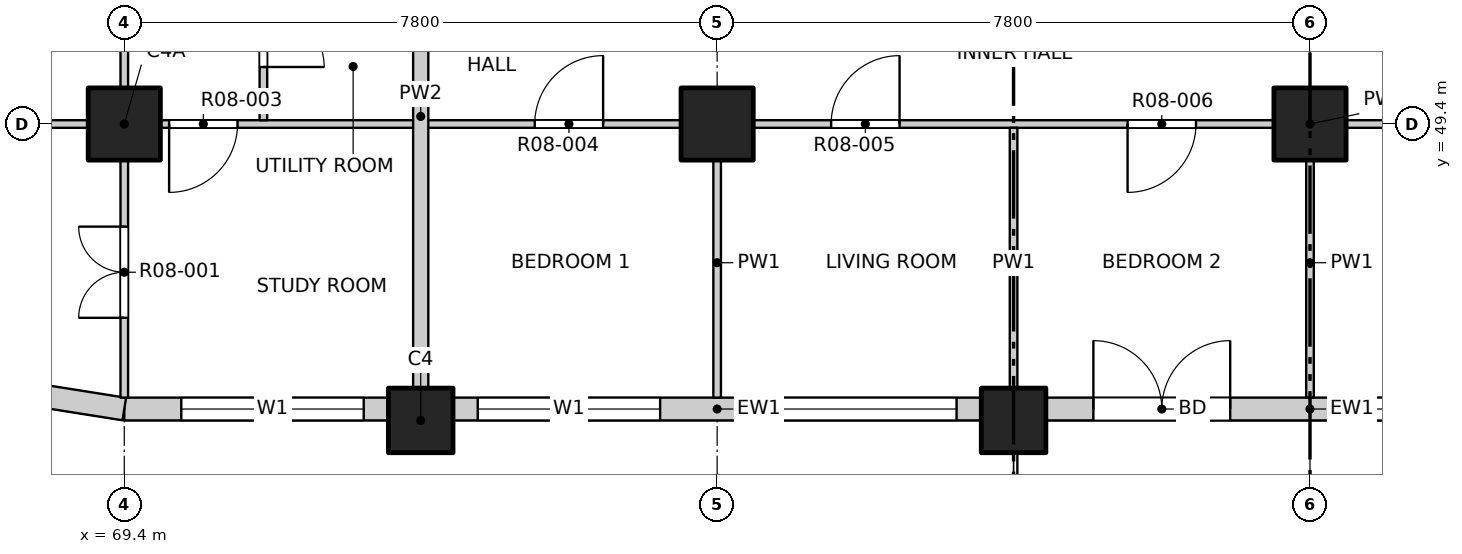
"""IFC4 building model, lengths in metres.
Left out: names, types, materials, properties, quantities, classifications, styles, units other than length and angle.
Written with IfcOpenShell. Run it as: python <this file> out.ifc"""

import sys

from ifc_helpers import new_model, si_unit, direction, frame, frame_2d, origin, origin_2d, place, context, subcontext, project, spatial, rectangle, extrude, element, fill, save


model = new_model("IFC4")
c1 = context("Model", 3, precision=1e-05, world=origin(), true_north=direction((0.0, 1.0)))
c2 = subcontext(c1, "Body", "Model", "MODEL_VIEW")
j1 = project(units=[si_unit("LENGTHUNIT", "METRE"), si_unit("PLANEANGLEUNIT", "RADIAN")], contexts=[c1])
p1 = place(None, origin())
s1 = spatial("IfcSite", under=j1, at=p1, CompositionType="ELEMENT")
p2 = place(p1, origin())
s2 = spatial("IfcBuilding", under=s1, at=p2, CompositionType="ELEMENT")
p3 = place(p2, frame((0.0, 0.0, 103.3)))
s3 = spatial("IfcBuildingStorey", under=s2, at=p3, CompositionType="ELEMENT", Elevation=103.3)
for number, where, z_axis, x_axis in (
    (1, (73.3, 45.5, -0.25), (0.0, 0.0, 1.0), (1.0, 0.0, 0.0)),
    (2, (81.1, 45.5, -0.25), (0.0, 0.0, 1.0), (1.0, 0.0, 0.0)),
):
    element("IfcColumn", number, at=place(p3, frame(where, z_axis=z_axis, x_axis=x_axis)), inside=s3, PredefinedType="COLUMN", context=c2, shape_type="SweptSolid", body=[
        extrude(rectangle(XDim=0.85, YDim=0.85, at=origin_2d()), origin(), (0.0, 0.0, 1.0), 3.4),
    ])
for number, where, z_axis, x_axis in (
    (3, (69.4, 49.4, -0.25), (0.0, 0.0, 1.0), (1.0, 0.0, 0.0)),
    (4, (77.2, 49.4, -0.25), (0.0, 0.0, 1.0), (1.0, 0.0, 0.0)),
    (5, (85.0, 49.4, -0.25), (0.0, 0.0, 1.0), (1.0, 0.0, 0.0)),
):
    element("IfcColumn", number, at=place(p3, frame(where, z_axis=z_axis, x_axis=x_axis)), inside=s3, PredefinedType="COLUMN", context=c2, shape_type="SweptSolid", body=[
        extrude(rectangle(XDim=0.95, YDim=0.95, at=origin_2d()), origin(), (0.0, 0.0, 1.0), 3.4),
    ])
p4 = place(p3, frame((69.4, 45.65, 0.0), z_axis=(0.0, 0.0, 1.0), x_axis=(1.0, 0.0, 0.0)))
e6 = element("IfcWall", 6, at=p4, inside=s3, PredefinedType="SOLIDWALL", context=c2, shape_type="SweptSolid", body=[
    extrude(rectangle(XDim=3.475, YDim=0.3, at=frame_2d((1.738, 0.0))), origin(), (0.0, 0.0, 1.0), 2.7),
])
p5 = place(p4, frame((0.75, 0.0, 0.9)))
e7 = element("IfcOpeningElement", 7, at=p5, cuts=e6, PredefinedType="OPENING", context=c2, shape_type="SweptSolid", body=[
    extrude(rectangle(XDim=2.4, YDim=1.8, at=frame_2d((1.2, 0.9))), frame((0.0, 0.16, 0.0), z_axis=(0.0, -1.0, 0.0), x_axis=(1.0, 0.0, 0.0)), (0.0, 0.0, 1.0), 0.32),
])
p6 = place(p3, frame((73.725, 45.65, 0.0), z_axis=(0.0, 0.0, 1.0), x_axis=(1.0, 0.0, 0.0)))
e8 = element("IfcWall", 8, at=p6, inside=s3, PredefinedType="SOLIDWALL", context=c2, shape_type="SweptSolid", body=[
    extrude(rectangle(XDim=6.95, YDim=0.3, at=frame_2d((3.475, 0.0))), origin(), (0.0, 0.0, 1.0), 2.7),
])
p7 = place(p6, frame((0.325, 0.0, 0.9)))
e9 = element("IfcOpeningElement", 9, at=p7, cuts=e8, PredefinedType="OPENING", context=c2, shape_type="SweptSolid", body=[
    extrude(rectangle(XDim=2.4, YDim=1.8, at=frame_2d((1.2, 0.9))), frame((0.0, 0.16, 0.0), z_axis=(0.0, -1.0, 0.0), x_axis=(1.0, 0.0, 0.0)), (0.0, 0.0, 1.0), 0.32),
])
p8 = place(p6, frame((4.225, 0.0, 0.9)))
e10 = element("IfcOpeningElement", 10, at=p8, cuts=e8, PredefinedType="OPENING", context=c2, shape_type="SweptSolid", body=[
    extrude(rectangle(XDim=2.4, YDim=1.8, at=frame_2d((1.2, 0.9))), frame((0.0, 0.16, 0.0), z_axis=(0.0, -1.0, 0.0), x_axis=(1.0, 0.0, 0.0)), (0.0, 0.0, 1.0), 0.32),
])
p9 = place(p3, frame((81.525, 45.65, 0.0), z_axis=(0.0, 0.0, 1.0), x_axis=(1.0, 0.0, 0.0)))
e11 = element("IfcWall", 11, at=p9, inside=s3, PredefinedType="SOLIDWALL", context=c2, shape_type="SweptSolid", body=[
    extrude(rectangle(XDim=6.95, YDim=0.3, at=frame_2d((3.475, 0.0))), origin(), (0.0, 0.0, 1.0), 2.7),
])
p10 = place(p9, frame((0.625, 0.0, 0.0)))
e12 = element("IfcOpeningElement", 12, at=p10, cuts=e11, PredefinedType="OPENING", context=c2, shape_type="SweptSolid", body=[
    extrude(rectangle(XDim=1.8, YDim=2.4, at=frame_2d((0.9, 1.2))), frame((0.0, 0.16, 0.0), z_axis=(0.0, -1.0, 0.0), x_axis=(1.0, 0.0, 0.0)), (0.0, 0.0, 1.0), 0.32),
])
p11 = place(p9, frame((4.225, 0.0, 0.9)))
e13 = element("IfcOpeningElement", 13, at=p11, cuts=e11, PredefinedType="OPENING", context=c2, shape_type="SweptSolid", body=[
    extrude(rectangle(XDim=2.4, YDim=1.8, at=frame_2d((1.2, 0.9))), frame((0.0, 0.16, 0.0), z_axis=(0.0, -1.0, 0.0), x_axis=(1.0, 0.0, 0.0)), (0.0, 0.0, 1.0), 0.32),
])
p12 = place(p3, frame((68.241, 45.833, 0.0), z_axis=(0.0, 0.0, 1.0), x_axis=(0.987678452879, -0.156496880861, 0.0)))
e14 = element("IfcWall", 14, at=p12, inside=s3, PredefinedType="SOLIDWALL", context=c2, shape_type="SweptSolid", body=[
    extrude(rectangle(XDim=1.173, YDim=0.3, at=frame_2d((0.586, 0.0))), origin(), (0.0, 0.0, 1.0), 2.7),
])
p13 = place(p3, frame((65.8, 49.4, 0.0), z_axis=(0.0, 0.0, 1.0), x_axis=(1.0, 0.0, 0.0)))
e15 = element("IfcWall", 15, at=p13, inside=s3, PredefinedType="PARTITIONING", context=c2, shape_type="SweptSolid", body=[
    extrude(rectangle(XDim=38.4, YDim=0.1, at=frame_2d((19.2, 0.0))), origin(), (0.0, 0.0, 1.0), 3.15),
])
p14 = place(p13, frame((4.19, 0.0, 0.0)))
e16 = element("IfcOpeningElement", 16, at=p14, cuts=e15, PredefinedType="OPENING", context=c2, shape_type="SweptSolid", body=[
    extrude(rectangle(XDim=0.9, YDim=2.1, at=frame_2d((0.45, 1.05))), frame((0.0, 0.06, 0.0), z_axis=(0.0, -1.0, 0.0), x_axis=(1.0, 0.0, 0.0)), (0.0, 0.0, 1.0), 0.12),
])
p15 = place(p13, frame((9.0, 0.0, 0.0)))
e17 = element("IfcOpeningElement", 17, at=p15, cuts=e15, PredefinedType="OPENING", context=c2, shape_type="SweptSolid", body=[
    extrude(rectangle(XDim=0.9, YDim=2.1, at=frame_2d((0.45, 1.05))), frame((0.0, 0.06, 0.0), z_axis=(0.0, -1.0, 0.0), x_axis=(1.0, 0.0, 0.0)), (0.0, 0.0, 1.0), 0.12),
])
p16 = place(p13, frame((12.9, 0.0, 0.0)))
e18 = element("IfcOpeningElement", 18, at=p16, cuts=e15, PredefinedType="OPENING", context=c2, shape_type="SweptSolid", body=[
    extrude(rectangle(XDim=0.9, YDim=2.1, at=frame_2d((0.45, 1.05))), frame((0.0, 0.06, 0.0), z_axis=(0.0, -1.0, 0.0), x_axis=(1.0, 0.0, 0.0)), (0.0, 0.0, 1.0), 0.12),
])
p17 = place(p13, frame((16.8, 0.0, 0.0)))
e19 = element("IfcOpeningElement", 19, at=p17, cuts=e15, PredefinedType="OPENING", context=c2, shape_type="SweptSolid", body=[
    extrude(rectangle(XDim=0.9, YDim=2.1, at=frame_2d((0.45, 1.05))), frame((0.0, 0.06, 0.0), z_axis=(0.0, -1.0, 0.0), x_axis=(1.0, 0.0, 0.0)), (0.0, 0.0, 1.0), 0.12),
])
p18 = place(p13, frame((20.7, 0.0, 0.0)))
e20 = element("IfcOpeningElement", 20, at=p18, cuts=e15, PredefinedType="OPENING", context=c2, shape_type="SweptSolid", body=[
    extrude(rectangle(XDim=0.9, YDim=2.1, at=frame_2d((0.45, 1.05))), frame((0.0, 0.06, 0.0), z_axis=(0.0, -1.0, 0.0), x_axis=(1.0, 0.0, 0.0)), (0.0, 0.0, 1.0), 0.12),
])
p19 = place(p13, frame((24.6, 0.0, 0.0)))
e21 = element("IfcOpeningElement", 21, at=p19, cuts=e15, PredefinedType="OPENING", context=c2, shape_type="SweptSolid", body=[
    extrude(rectangle(XDim=0.9, YDim=2.1, at=frame_2d((0.45, 1.05))), frame((0.0, 0.06, 0.0), z_axis=(0.0, -1.0, 0.0), x_axis=(1.0, 0.0, 0.0)), (0.0, 0.0, 1.0), 0.12),
])
p20 = place(p13, frame((28.5, 0.0, 0.0)))
e22 = element("IfcOpeningElement", 22, at=p20, cuts=e15, PredefinedType="OPENING", context=c2, shape_type="SweptSolid", body=[
    extrude(rectangle(XDim=0.9, YDim=2.1, at=frame_2d((0.45, 1.05))), frame((0.0, 0.06, 0.0), z_axis=(0.0, -1.0, 0.0), x_axis=(1.0, 0.0, 0.0)), (0.0, 0.0, 1.0), 0.12),
])
p21 = place(p13, frame((33.31, 0.0, 0.0)))
e23 = element("IfcOpeningElement", 23, at=p21, cuts=e15, PredefinedType="OPENING", context=c2, shape_type="SweptSolid", body=[
    extrude(rectangle(XDim=0.9, YDim=2.1, at=frame_2d((0.45, 1.05))), frame((0.0, 0.06, 0.0), z_axis=(0.0, -1.0, 0.0), x_axis=(1.0, 0.0, 0.0)), (0.0, 0.0, 1.0), 0.12),
])
p22 = place(p3, frame((69.4, 45.8, 0.0), z_axis=(0.0, 0.0, 1.0), x_axis=(0.0, 1.0, 0.0)))
e24 = element("IfcWall", 24, at=p22, inside=s3, PredefinedType="PARTITIONING", context=c2, shape_type="SweptSolid", body=[
    extrude(rectangle(XDim=38.4, YDim=0.1, at=frame_2d((19.2, 0.0))), origin(), (0.0, 0.0, 1.0), 3.15),
])
p23 = place(p22, frame((1.05, 0.0, 0.0)))
e25 = element("IfcOpeningElement", 25, at=p23, cuts=e24, PredefinedType="OPENING", context=c2, shape_type="SweptSolid", body=[
    extrude(rectangle(XDim=1.2, YDim=2.1, at=frame_2d((0.6, 1.05))), frame((0.0, 0.06, 0.0), z_axis=(0.0, -1.0, 0.0), x_axis=(1.0, 0.0, 0.0)), (0.0, 0.0, 1.0), 0.12),
])
p24 = place(p22, frame((5.1, 0.0, 0.0)))
e26 = element("IfcOpeningElement", 26, at=p24, cuts=e24, PredefinedType="OPENING", context=c2, shape_type="SweptSolid", body=[
    extrude(rectangle(XDim=0.9, YDim=2.1, at=frame_2d((0.45, 1.05))), frame((0.0, 0.06, 0.0), z_axis=(0.0, -1.0, 0.0), x_axis=(1.0, 0.0, 0.0)), (0.0, 0.0, 1.0), 0.12),
])
p25 = place(p22, frame((9.0, 0.0, 0.0)))
e27 = element("IfcOpeningElement", 27, at=p25, cuts=e24, PredefinedType="OPENING", context=c2, shape_type="SweptSolid", body=[
    extrude(rectangle(XDim=0.9, YDim=2.1, at=frame_2d((0.45, 1.05))), frame((0.0, 0.06, 0.0), z_axis=(0.0, -1.0, 0.0), x_axis=(1.0, 0.0, 0.0)), (0.0, 0.0, 1.0), 0.12),
])
p26 = place(p22, frame((12.9, 0.0, 0.0)))
e28 = element("IfcOpeningElement", 28, at=p26, cuts=e24, PredefinedType="OPENING", context=c2, shape_type="SweptSolid", body=[
    extrude(rectangle(XDim=0.9, YDim=2.1, at=frame_2d((0.45, 1.05))), frame((0.0, 0.06, 0.0), z_axis=(0.0, -1.0, 0.0), x_axis=(1.0, 0.0, 0.0)), (0.0, 0.0, 1.0), 0.12),
])
p27 = place(p22, frame((16.8, 0.0, 0.0)))
e29 = element("IfcOpeningElement", 29, at=p27, cuts=e24, PredefinedType="OPENING", context=c2, shape_type="SweptSolid", body=[
    extrude(rectangle(XDim=0.9, YDim=2.1, at=frame_2d((0.45, 1.05))), frame((0.0, 0.06, 0.0), z_axis=(0.0, -1.0, 0.0), x_axis=(1.0, 0.0, 0.0)), (0.0, 0.0, 1.0), 0.12),
])
p28 = place(p22, frame((20.7, 0.0, 0.0)))
e30 = element("IfcOpeningElement", 30, at=p28, cuts=e24, PredefinedType="OPENING", context=c2, shape_type="SweptSolid", body=[
    extrude(rectangle(XDim=0.9, YDim=2.1, at=frame_2d((0.45, 1.05))), frame((0.0, 0.06, 0.0), z_axis=(0.0, -1.0, 0.0), x_axis=(1.0, 0.0, 0.0)), (0.0, 0.0, 1.0), 0.12),
])
p29 = place(p22, frame((24.6, 0.0, 0.0)))
e31 = element("IfcOpeningElement", 31, at=p29, cuts=e24, PredefinedType="OPENING", context=c2, shape_type="SweptSolid", body=[
    extrude(rectangle(XDim=0.9, YDim=2.1, at=frame_2d((0.45, 1.05))), frame((0.0, 0.06, 0.0), z_axis=(0.0, -1.0, 0.0), x_axis=(1.0, 0.0, 0.0)), (0.0, 0.0, 1.0), 0.12),
])
p30 = place(p22, frame((28.5, 0.0, 0.0)))
e32 = element("IfcOpeningElement", 32, at=p30, cuts=e24, PredefinedType="OPENING", context=c2, shape_type="SweptSolid", body=[
    extrude(rectangle(XDim=0.9, YDim=2.1, at=frame_2d((0.45, 1.05))), frame((0.0, 0.06, 0.0), z_axis=(0.0, -1.0, 0.0), x_axis=(1.0, 0.0, 0.0)), (0.0, 0.0, 1.0), 0.12),
])
p31 = place(p22, frame((32.4, 0.0, 0.0)))
e33 = element("IfcOpeningElement", 33, at=p31, cuts=e24, PredefinedType="OPENING", context=c2, shape_type="SweptSolid", body=[
    extrude(rectangle(XDim=0.9, YDim=2.1, at=frame_2d((0.45, 1.05))), frame((0.0, 0.06, 0.0), z_axis=(0.0, -1.0, 0.0), x_axis=(1.0, 0.0, 0.0)), (0.0, 0.0, 1.0), 0.12),
])
p32 = place(p22, frame((36.15, 0.0, 0.0)))
e34 = element("IfcOpeningElement", 34, at=p32, cuts=e24, PredefinedType="OPENING", context=c2, shape_type="SweptSolid", body=[
    extrude(rectangle(XDim=1.2, YDim=2.1, at=frame_2d((0.6, 1.05))), frame((0.0, 0.06, 0.0), z_axis=(0.0, -1.0, 0.0), x_axis=(1.0, 0.0, 0.0)), (0.0, 0.0, 1.0), 0.12),
])
p33 = place(p3, frame((71.23, 49.45, 0.0), z_axis=(0.0, 0.0, 1.0), x_axis=(0.0, 1.0, 0.0)))
e35 = element("IfcWall", 35, at=p33, inside=s3, PredefinedType="PARTITIONING", context=c2, shape_type="SweptSolid", body=[
    extrude(rectangle(XDim=9.05, YDim=0.1, at=frame_2d((4.525, 0.0))), origin(), (0.0, 0.0, 1.0), 3.15),
])
p34 = place(p33, frame((0.7, 0.0, 0.0)))
e36 = element("IfcOpeningElement", 36, at=p34, cuts=e35, PredefinedType="OPENING", context=c2, shape_type="SweptSolid", body=[
    extrude(rectangle(XDim=0.8, YDim=2.1, at=frame_2d((0.4, 1.05))), frame((0.0, 0.06, 0.0), z_axis=(0.0, -1.0, 0.0), x_axis=(1.0, 0.0, 0.0)), (0.0, 0.0, 1.0), 0.12),
])
p35 = place(p33, frame((3.0, 0.0, 0.0)))
e37 = element("IfcOpeningElement", 37, at=p35, cuts=e35, PredefinedType="OPENING", context=c2, shape_type="SweptSolid", body=[
    extrude(rectangle(XDim=0.9, YDim=2.1, at=frame_2d((0.45, 1.05))), frame((0.0, 0.06, 0.0), z_axis=(0.0, -1.0, 0.0), x_axis=(1.0, 0.0, 0.0)), (0.0, 0.0, 1.0), 0.12),
])
p36 = place(p33, frame((5.575, 0.0, 0.0)))
e38 = element("IfcOpeningElement", 38, at=p36, cuts=e35, PredefinedType="OPENING", context=c2, shape_type="SweptSolid", body=[
    extrude(rectangle(XDim=0.8, YDim=2.1, at=frame_2d((0.4, 1.05))), frame((0.0, 0.06, 0.0), z_axis=(0.0, -1.0, 0.0), x_axis=(1.0, 0.0, 0.0)), (0.0, 0.0, 1.0), 0.12),
])
p37 = place(p33, frame((7.75, 0.0, 0.0)))
e39 = element("IfcOpeningElement", 39, at=p37, cuts=e35, PredefinedType="OPENING", context=c2, shape_type="SweptSolid", body=[
    extrude(rectangle(XDim=0.9, YDim=2.1, at=frame_2d((0.45, 1.05))), frame((0.0, 0.06, 0.0), z_axis=(0.0, -1.0, 0.0), x_axis=(1.0, 0.0, 0.0)), (0.0, 0.0, 1.0), 0.12),
])
p38 = place(p3, frame((73.3, 45.8, 0.0), z_axis=(0.0, 0.0, 1.0), x_axis=(0.0, 1.0, 0.0)))
e40 = element("IfcWall", 40, at=p38, inside=s3, PredefinedType="PARTITIONING", context=c2, shape_type="SweptSolid", body=[
    extrude(rectangle(XDim=7.4, YDim=0.2, at=frame_2d((3.7, 0.0))), origin(), (0.0, 0.0, 1.0), 3.15),
])
p39 = place(p3, frame((77.2, 45.8, 0.0), z_axis=(0.0, 0.0, 1.0), x_axis=(0.0, 1.0, 0.0)))
e41 = element("IfcWall", 41, at=p39, inside=s3, PredefinedType="PARTITIONING", context=c2, shape_type="SweptSolid", body=[
    extrude(rectangle(XDim=3.55, YDim=0.1, at=frame_2d((1.775, 0.0))), origin(), (0.0, 0.0, 1.0), 3.15),
])
p40 = place(p3, frame((81.1, 45.8, 0.0), z_axis=(0.0, 0.0, 1.0), x_axis=(0.0, 1.0, 0.0)))
e42 = element("IfcWall", 42, at=p40, inside=s3, PredefinedType="PARTITIONING", context=c2, shape_type="SweptSolid", body=[
    extrude(rectangle(XDim=3.55, YDim=0.1, at=frame_2d((1.775, 0.0))), origin(), (0.0, 0.0, 1.0), 2.55),
])
p41 = place(p3, frame((85.0, 45.8, 0.0), z_axis=(0.0, 0.0, 1.0), x_axis=(0.0, 1.0, 0.0)))
e43 = element("IfcWall", 43, at=p41, inside=s3, PredefinedType="PARTITIONING", context=c2, shape_type="SweptSolid", body=[
    extrude(rectangle(XDim=3.55, YDim=0.1, at=frame_2d((1.775, 0.0))), origin(), (0.0, 0.0, 1.0), 3.15),
])
p42 = place(p5, origin())
e44 = element("IfcWindow", 44, at=p42, inside=s3, PartitioningType="DOUBLE_PANEL_VERTICAL", PredefinedType="WINDOW", context=c2, shape_type="SweptSolid", body=[
    extrude(rectangle(XDim=2.4, YDim=1.8, at=frame_2d((1.2, 0.9))), frame((0.0, 0.03, 0.0), z_axis=(0.0, -1.0, 0.0), x_axis=(1.0, 0.0, 0.0)), (0.0, 0.0, 1.0), 0.06),
])
fill(e7, e44)
p43 = place(p7, origin())
e45 = element("IfcWindow", 45, at=p43, inside=s3, PartitioningType="DOUBLE_PANEL_VERTICAL", PredefinedType="WINDOW", context=c2, shape_type="SweptSolid", body=[
    extrude(rectangle(XDim=2.4, YDim=1.8, at=frame_2d((1.2, 0.9))), frame((0.0, 0.03, 0.0), z_axis=(0.0, -1.0, 0.0), x_axis=(1.0, 0.0, 0.0)), (0.0, 0.0, 1.0), 0.06),
])
fill(e9, e45)
p44 = place(p8, origin())
e46 = element("IfcWindow", 46, at=p44, inside=s3, PartitioningType="DOUBLE_PANEL_VERTICAL", PredefinedType="WINDOW", context=c2, shape_type="SweptSolid", body=[
    extrude(rectangle(XDim=2.4, YDim=1.8, at=frame_2d((1.2, 0.9))), frame((0.0, 0.03, 0.0), z_axis=(0.0, -1.0, 0.0), x_axis=(1.0, 0.0, 0.0)), (0.0, 0.0, 1.0), 0.06),
])
fill(e10, e46)
p45 = place(p10, origin())
e47 = element("IfcDoor", 47, at=p45, inside=s3, OperationType="DOUBLE_DOOR_SINGLE_SWING", PredefinedType="DOOR", context=c2, shape_type="SweptSolid", body=[
    extrude(rectangle(XDim=1.8, YDim=2.4, at=frame_2d((0.9, 1.2))), frame((0.0, 0.025, 0.0), z_axis=(0.0, -1.0, 0.0), x_axis=(1.0, 0.0, 0.0)), (0.0, 0.0, 1.0), 0.05),
])
fill(e12, e47)
p46 = place(p11, origin())
e48 = element("IfcWindow", 48, at=p46, inside=s3, PartitioningType="DOUBLE_PANEL_VERTICAL", PredefinedType="WINDOW", context=c2, shape_type="SweptSolid", body=[
    extrude(rectangle(XDim=2.4, YDim=1.8, at=frame_2d((1.2, 0.9))), frame((0.0, 0.03, 0.0), z_axis=(0.0, -1.0, 0.0), x_axis=(1.0, 0.0, 0.0)), (0.0, 0.0, 1.0), 0.06),
])
fill(e13, e48)
p47 = place(p23, origin())
e49 = element("IfcDoor", 49, at=p47, inside=s3, OperationType="DOUBLE_DOOR_SINGLE_SWING", PredefinedType="DOOR", context=c2, shape_type="SweptSolid", body=[
    extrude(rectangle(XDim=1.2, YDim=2.1, at=frame_2d((0.6, 1.05))), frame((0.0, 0.025, 0.0), z_axis=(0.0, -1.0, 0.0), x_axis=(1.0, 0.0, 0.0)), (0.0, 0.0, 1.0), 0.05),
])
fill(e25, e49)
p48 = place(p14, origin())
e50 = element("IfcDoor", 50, at=p48, inside=s3, OperationType="SINGLE_SWING_RIGHT", PredefinedType="DOOR", context=c2, shape_type="SweptSolid", body=[
    extrude(rectangle(XDim=0.9, YDim=2.1, at=frame_2d((0.45, 1.05))), frame((0.0, 0.025, 0.0), z_axis=(0.0, -1.0, 0.0), x_axis=(1.0, 0.0, 0.0)), (0.0, 0.0, 1.0), 0.05),
])
fill(e16, e50)
p49 = place(p15, origin())
e51 = element("IfcDoor", 51, at=p49, inside=s3, OperationType="SINGLE_SWING_RIGHT", PredefinedType="DOOR", context=c2, shape_type="SweptSolid", body=[
    extrude(rectangle(XDim=0.9, YDim=2.1, at=frame_2d((0.45, 1.05))), frame((0.0, 0.025, 0.0), z_axis=(0.0, -1.0, 0.0), x_axis=(1.0, 0.0, 0.0)), (0.0, 0.0, 1.0), 0.05),
])
fill(e17, e51)
p50 = place(p16, origin())
e52 = element("IfcDoor", 52, at=p50, inside=s3, OperationType="SINGLE_SWING_RIGHT", PredefinedType="DOOR", context=c2, shape_type="SweptSolid", body=[
    extrude(rectangle(XDim=0.9, YDim=2.1, at=frame_2d((0.45, 1.05))), frame((0.0, 0.025, 0.0), z_axis=(0.0, -1.0, 0.0), x_axis=(1.0, 0.0, 0.0)), (0.0, 0.0, 1.0), 0.05),
])
fill(e18, e52)
p51 = place(p17, origin())
e53 = element("IfcDoor", 53, at=p51, inside=s3, OperationType="SINGLE_SWING_RIGHT", PredefinedType="DOOR", context=c2, shape_type="SweptSolid", body=[
    extrude(rectangle(XDim=0.9, YDim=2.1, at=frame_2d((0.45, 1.05))), frame((0.0, 0.025, 0.0), z_axis=(0.0, -1.0, 0.0), x_axis=(1.0, 0.0, 0.0)), (0.0, 0.0, 1.0), 0.05),
])
fill(e19, e53)
p52 = place(p34, origin())
e54 = element("IfcDoor", 54, at=p52, inside=s3, OperationType="SINGLE_SWING_RIGHT", PredefinedType="DOOR", context=c2, shape_type="SweptSolid", body=[
    extrude(rectangle(XDim=0.8, YDim=2.1, at=frame_2d((0.4, 1.05))), frame((0.0, 0.025, 0.0), z_axis=(0.0, -1.0, 0.0), x_axis=(1.0, 0.0, 0.0)), (0.0, 0.0, 1.0), 0.05),
])
fill(e36, e54)
save(model, sys.argv[1])
